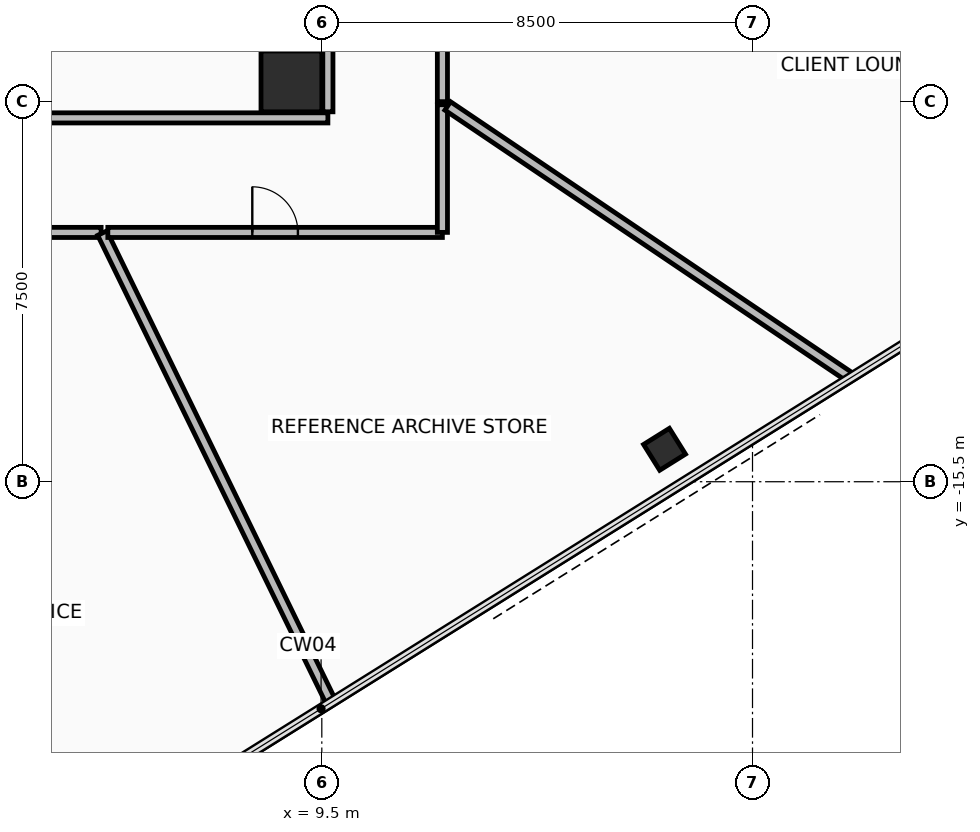
"""IFC4 building model, lengths in metres.
Left out: names, types, materials, properties, quantities, classifications, styles, units other than length and angle.
Written with IfcOpenShell. Run it as: python <this file> out.ifc"""

import sys

from ifc_helpers import new_model, si_unit, direction, frame, frame_2d, origin, origin_2d, place, context, subcontext, project, spatial, rectangle, hollow_rectangle, extrude, element, fill, save


model = new_model("IFC4")
c1 = context("Model", 3, precision=1e-05, world=origin(), true_north=direction((0.0, 1.0)))
c2 = subcontext(c1, "Body", "Model", "MODEL_VIEW")
j1 = project(units=[si_unit("LENGTHUNIT", "METRE"), si_unit("PLANEANGLEUNIT", "RADIAN")], contexts=[c1])
p1 = place(None, origin())
s1 = spatial("IfcSite", under=j1, at=p1, CompositionType="ELEMENT")
p2 = place(p1, origin())
s2 = spatial("IfcBuilding", under=s1, at=p2, CompositionType="ELEMENT")
p3 = place(p2, frame((0.0, 0.0, 149.6)))
s3 = spatial("IfcBuildingStorey", under=s2, at=p3, CompositionType="ELEMENT", Elevation=149.6)
p4 = place(p3, frame((8.9, -7.6, 0.0), z_axis=(0.0, 0.0, 1.0), x_axis=(1.0, 0.0, 0.0)))
e1 = element("IfcColumn", 1, at=p4, inside=s3, PredefinedType="COLUMN", context=c2, shape_type="SweptSolid", body=[
    extrude(rectangle(XDim=1.2, YDim=1.2, at=origin_2d()), origin(), (0.0, 0.0, 1.0), 3.6),
])
p5 = place(p3, frame((16.264, -14.86, 0.0), z_axis=(0.0, 0.0, 1.0), x_axis=(0.848047171272, 0.529920744356, 0.0)))
e2 = element("IfcColumn", 2, at=p5, inside=s3, PredefinedType="COLUMN", context=c2, shape_type="SweptSolid", body=[
    extrude(hollow_rectangle(XDim=0.6, YDim=0.6, WallThickness=0.036, at=origin_2d()), origin(), (0.0, 0.0, 1.0), 3.6),
])
p6 = place(p3, frame((-9.62, -8.32, 0.0), z_axis=(0.0, 0.0, 1.0), x_axis=(1.0, 0.0, 0.0)))
e3 = element("IfcWall", 3, at=p6, inside=s3, PredefinedType="PARTITIONING", context=c2, shape_type="SweptSolid", body=[
    extrude(rectangle(XDim=19.24, YDim=0.2, at=frame_2d((9.62, 0.0))), origin(), (0.0, 0.0, 1.0), 2.855),
])
p7 = place(p6, frame((7.37, 0.0, 0.0)))
e4 = element("IfcOpeningElement", 4, at=p7, cuts=e3, PredefinedType="OPENING", context=c2, shape_type="SweptSolid", body=[
    extrude(rectangle(XDim=0.9, YDim=2.1, at=frame_2d((0.45, 1.05))), frame((0.0, 0.11, 0.0), z_axis=(0.0, -1.0, 0.0), x_axis=(1.0, 0.0, 0.0)), (0.0, 0.0, 1.0), 0.22),
])
p8 = place(p6, frame((10.77, 0.0, 0.0)))
e5 = element("IfcOpeningElement", 5, at=p8, cuts=e3, PredefinedType="OPENING", context=c2, shape_type="SweptSolid", body=[
    extrude(rectangle(XDim=0.9, YDim=2.1, at=frame_2d((0.45, 1.05))), frame((0.0, 0.11, 0.0), z_axis=(0.0, -1.0, 0.0), x_axis=(1.0, 0.0, 0.0)), (0.0, 0.0, 1.0), 0.22),
])
p9 = place(p3, frame((9.62, -8.2, 0.0), z_axis=(0.0, 0.0, 1.0), x_axis=(0.0, 1.0, 0.0)))
e6 = element("IfcWall", 6, at=p9, inside=s3, PredefinedType="PARTITIONING", context=c2, shape_type="SweptSolid", body=[
    extrude(rectangle(XDim=16.4, YDim=0.2, at=frame_2d((8.2, 0.0))), origin(), (0.0, 0.0, 1.0), 2.855),
])
p10 = place(p9, frame((12.65, 0.0, 0.0)))
e7 = element("IfcOpeningElement", 7, at=p10, cuts=e6, PredefinedType="OPENING", context=c2, shape_type="SweptSolid", body=[
    extrude(rectangle(XDim=1.1, YDim=2.15, at=frame_2d((0.55, 1.075))), frame((0.0, 0.11, 0.0), z_axis=(0.0, -1.0, 0.0), x_axis=(1.0, 0.0, 0.0)), (0.0, 0.0, 1.0), 0.22),
])
p11 = place(p3, frame((-0.717, -10.58, 0.0), z_axis=(0.0, 0.0, 1.0), x_axis=(1.0, 0.0, 0.0)))
e8 = element("IfcWall", 8, at=p11, inside=s3, PredefinedType="PARTITIONING", context=c2, shape_type="SweptSolid", body=[
    extrude(rectangle(XDim=5.861, YDim=0.2, at=frame_2d((2.931, 0.0))), origin(), (0.0, 0.0, 1.0), 3.41),
])
p12 = place(p11, frame((2.431, 0.0, 0.0)))
e9 = element("IfcOpeningElement", 9, at=p12, cuts=e8, PredefinedType="OPENING", context=c2, shape_type="SweptSolid", body=[
    extrude(rectangle(XDim=1.0, YDim=2.15, at=frame_2d((0.5, 1.075))), frame((0.0, 0.11, 0.0), z_axis=(0.0, -1.0, 0.0), x_axis=(1.0, 0.0, 0.0)), (0.0, 0.0, 1.0), 0.22),
])
p13 = place(p3, frame((5.167, -10.594, 0.0), z_axis=(0.0, 0.0, 1.0), x_axis=(0.438378255041, -0.898790579338, 0.0)))
e10 = element("IfcWall", 10, at=p13, inside=s3, PredefinedType="PARTITIONING", context=c2, shape_type="SweptSolid", body=[
    extrude(rectangle(XDim=10.282, YDim=0.2, at=frame_2d((5.141, 0.0))), origin(), (0.0, 0.0, 1.0), 2.705),
])
p14 = place(p3, frame((5.277, -10.58, 0.0), z_axis=(0.0, 0.0, 1.0), x_axis=(1.0, 0.0, 0.0)))
e11 = element("IfcWall", 11, at=p14, inside=s3, PredefinedType="PARTITIONING", context=c2, shape_type="SweptSolid", body=[
    extrude(rectangle(XDim=6.602, YDim=0.2, at=frame_2d((3.301, 0.0))), origin(), (0.0, 0.0, 1.0), 2.855),
])
p15 = place(p14, frame((2.851, 0.0, 0.0)))
e12 = element("IfcOpeningElement", 12, at=p15, cuts=e11, PredefinedType="OPENING", context=c2, shape_type="SweptSolid", body=[
    extrude(rectangle(XDim=0.9, YDim=2.1, at=frame_2d((0.45, 1.05))), frame((0.0, 0.11, 0.0), z_axis=(0.0, -1.0, 0.0), x_axis=(1.0, 0.0, 0.0)), (0.0, 0.0, 1.0), 0.22),
])
p16 = place(p3, frame((11.88, -10.579, 0.0), z_axis=(0.0, 0.0, 1.0), x_axis=(0.0, 1.0, 0.0)))
e13 = element("IfcWall", 13, at=p16, inside=s3, PredefinedType="PARTITIONING", context=c2, shape_type="SweptSolid", body=[
    extrude(rectangle(XDim=2.519, YDim=0.2, at=frame_2d((1.26, 0.0))), origin(), (0.0, 0.0, 1.0), 2.855),
])
p17 = place(p3, frame((11.985, -8.084, 0.0), z_axis=(0.0, 0.0, 1.0), x_axis=(0.8290350884, -0.559196586365, 0.0)))
e14 = element("IfcWall", 14, at=p17, inside=s3, PredefinedType="PARTITIONING", context=c2, shape_type="SweptSolid", body=[
    extrude(rectangle(XDim=9.593, YDim=0.2, at=frame_2d((4.797, 0.0))), origin(), (0.0, 0.0, 1.0), 2.705),
])
p18 = place(p3, frame((11.88, -8.0, 0.0), z_axis=(0.0, 0.0, 1.0), x_axis=(0.0, 1.0, 0.0)))
e15 = element("IfcWall", 15, at=p18, inside=s3, PredefinedType="PARTITIONING", context=c2, shape_type="SweptSolid", body=[
    extrude(rectangle(XDim=5.875, YDim=0.2, at=frame_2d((2.938, 0.0))), origin(), (0.0, 0.0, 1.0), 2.855),
])
p19 = place(p15, origin())
e16 = element("IfcDoor", 16, at=p19, inside=s3, OperationType="SINGLE_SWING_LEFT", PredefinedType="DOOR", context=c2, shape_type="SweptSolid", body=[
    extrude(rectangle(XDim=0.9, YDim=2.1, at=frame_2d((0.45, 1.05))), frame((0.0, 0.025, 0.0), z_axis=(0.0, -1.0, 0.0), x_axis=(1.0, 0.0, 0.0)), (0.0, 0.0, 1.0), 0.05),
])
fill(e12, e16)
save(model, sys.argv[1])
